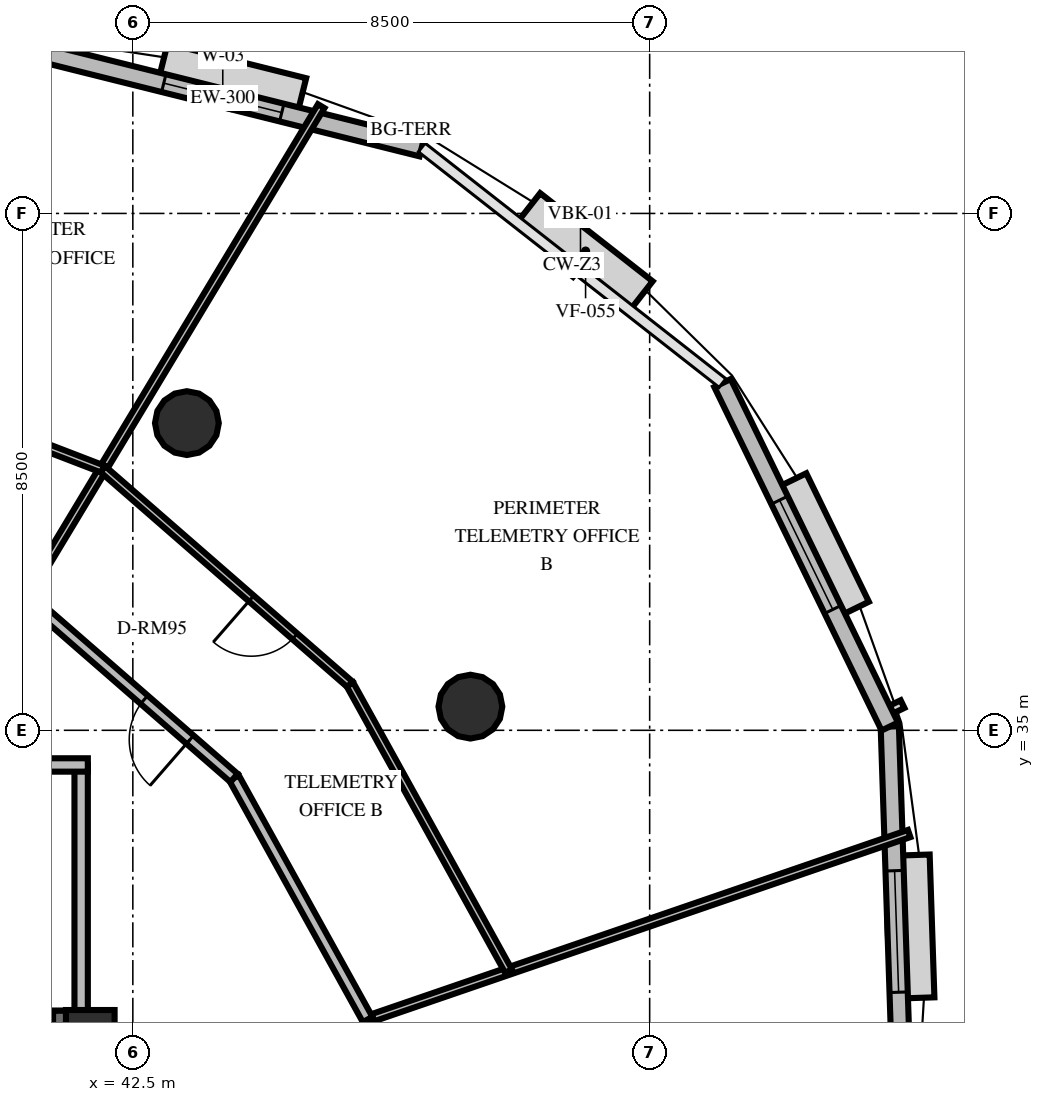
"""IFC4 building model, lengths in metres.
Left out: names, types, materials, properties, quantities, classifications, styles, units other than length and angle.
Written with IfcOpenShell. Run it as: python <this file> out.ifc"""

import sys

from ifc_helpers import new_model, si_unit, direction, frame, frame_2d, origin, origin_2d, place, context, subcontext, project, spatial, rectangle, circle, extrude, element, fill, save


model = new_model("IFC4")
c1 = context("Model", 3, precision=1e-05, world=origin(), true_north=direction((0.0, 1.0)))
c2 = subcontext(c1, "Body", "Model", "MODEL_VIEW")
j1 = project(units=[si_unit("LENGTHUNIT", "METRE"), si_unit("PLANEANGLEUNIT", "RADIAN")], contexts=[c1])
p1 = place(None, origin())
s1 = spatial("IfcSite", under=j1, at=p1, CompositionType="ELEMENT")
p2 = place(p1, origin())
s2 = spatial("IfcBuilding", under=s1, at=p2, CompositionType="ELEMENT")
p3 = place(p2, frame((0.0, 0.0, 195.2)))
s3 = spatial("IfcBuildingStorey", under=s2, at=p3, CompositionType="ELEMENT", Elevation=195.2)
p4 = place(p3, frame((26.072, 30.013, 0.0), z_axis=(0.0, 0.0, 1.0), x_axis=(1.0, 0.0, 0.0)))
e1 = element("IfcWall", 1, at=p4, inside=s3, PredefinedType="SHEAR", context=c2, shape_type="SweptSolid", body=[
    extrude(rectangle(XDim=15.866, YDim=0.75, at=frame_2d((7.933, 0.0))), origin(), (0.0, 0.0, 1.0), 3.6),
])
p5 = place(p4, frame((0.878, 0.0, 0.0)))
e2 = element("IfcOpeningElement", 2, at=p5, cuts=e1, PredefinedType="OPENING", context=c2, shape_type="SweptSolid", body=[
    extrude(rectangle(XDim=1.05, YDim=2.15, at=frame_2d((0.525, 1.075))), frame((0.0, 0.385, 0.0), z_axis=(0.0, -1.0, 0.0), x_axis=(1.0, 0.0, 0.0)), (0.0, 0.0, 1.0), 0.77),
])
p6 = place(p4, frame((13.928, 0.0, 0.0)))
e3 = element("IfcOpeningElement", 3, at=p6, cuts=e1, PredefinedType="OPENING", context=c2, shape_type="SweptSolid", body=[
    extrude(rectangle(XDim=1.05, YDim=2.15, at=frame_2d((0.525, 1.075))), frame((0.0, 0.385, 0.0), z_axis=(0.0, -1.0, 0.0), x_axis=(1.0, 0.0, 0.0)), (0.0, 0.0, 1.0), 0.77),
])
p7 = place(p4, frame((7.378, 0.0, 0.0)))
e4 = element("IfcOpeningElement", 4, at=p7, cuts=e1, PredefinedType="OPENING", context=c2, shape_type="SweptSolid", body=[
    extrude(rectangle(XDim=1.1, YDim=2.15, at=frame_2d((0.55, 1.075))), frame((0.0, 0.385, 0.0), z_axis=(0.0, -1.0, 0.0), x_axis=(1.0, 0.0, 0.0)), (0.0, 0.0, 1.0), 0.77),
])
p8 = place(p3, frame((41.563, 19.812, 0.0), z_axis=(0.0, 0.0, 1.0), x_axis=(0.0, 1.0, 0.0)))
e5 = element("IfcWall", 5, at=p8, inside=s3, PredefinedType="SHEAR", context=c2, shape_type="SweptSolid", body=[
    extrude(rectangle(XDim=10.576, YDim=0.75, at=frame_2d((5.288, 0.0))), origin(), (0.0, 0.0, 1.0), 3.6),
])
p9 = place(p3, frame((41.8, 30.0, 0.0), z_axis=(0.0, 0.0, 1.0), x_axis=(1.0, 0.0, 0.0)))
e6 = element("IfcColumn", 6, at=p9, inside=s3, PredefinedType="PILASTER", context=c2, shape_type="SweptSolid", body=[
    extrude(rectangle(XDim=0.8, YDim=0.8, at=origin_2d()), origin(), (0.0, 0.0, 1.0), 3.6),
])
for number, where, z_axis, x_axis in (
    (7, (48.052, 35.389, 0.0), (0.0, 0.0, 1.0), (1.0, 0.0, 0.0)),
    (8, (43.389, 40.052, 0.0), (0.0, 0.0, 1.0), (1.0, 0.0, 0.0)),
):
    element("IfcColumn", number, at=place(p3, frame(where, z_axis=z_axis, x_axis=x_axis)), inside=s3, PredefinedType="COLUMN", context=c2, shape_type="SweptSolid", body=[
        extrude(circle(Radius=0.525, at=origin_2d()), origin(), (0.0, 0.0, 1.0), 3.6),
    ])
p10 = place(p3, frame((47.252, 44.584, 0.0), z_axis=(0.0, 0.0, 1.0), x_axis=(-0.970265866101, 0.242041626748, 0.0)))
e9 = element("IfcWall", 9, at=p10, inside=s3, PredefinedType="SOLIDWALL", context=c2, shape_type="SweptSolid", body=[
    extrude(rectangle(XDim=6.745, YDim=0.3, at=frame_2d((3.373, 0.0))), origin(), (0.0, 0.0, 1.0), 2.66),
])
p11 = place(p10, frame((2.373, 0.0, 0.8)))
e10 = element("IfcOpeningElement", 10, at=p11, cuts=e9, PredefinedType="OPENING", context=c2, shape_type="SweptSolid", body=[
    extrude(rectangle(XDim=2.0, YDim=1.85, at=frame_2d((1.0, 0.925))), frame((0.0, 0.16, 0.0), z_axis=(0.0, -1.0, 0.0), x_axis=(1.0, 0.0, 0.0)), (0.0, 0.0, 1.0), 0.32),
])
p12 = place(p3, frame((55.174, 28.321, 0.0), z_axis=(0.0, 0.0, 1.0), x_axis=(-0.033263008574, 0.999446633023, 0.0)))
e11 = element("IfcWall", 11, at=p12, inside=s3, PredefinedType="SOLIDWALL", context=c2, shape_type="SweptSolid", body=[
    extrude(rectangle(XDim=6.745, YDim=0.3, at=frame_2d((3.373, 0.0))), origin(), (0.0, 0.0, 1.0), 2.66),
])
p13 = place(p12, frame((2.373, 0.0, 0.8)))
e12 = element("IfcOpeningElement", 12, at=p13, cuts=e11, PredefinedType="OPENING", context=c2, shape_type="SweptSolid", body=[
    extrude(rectangle(XDim=2.0, YDim=1.85, at=frame_2d((1.0, 0.925))), frame((0.0, 0.16, 0.0), z_axis=(0.0, -1.0, 0.0), x_axis=(1.0, 0.0, 0.0)), (0.0, 0.0, 1.0), 0.32),
])
p14 = place(p3, frame((54.949, 35.062, 0.0), z_axis=(0.0, 0.0, 1.0), x_axis=(-0.437909831955, 0.899018898064, 0.0)))
e13 = element("IfcWall", 13, at=p14, inside=s3, PredefinedType="SOLIDWALL", context=c2, shape_type="SweptSolid", body=[
    extrude(rectangle(XDim=6.283, YDim=0.3, at=frame_2d((3.141, 0.0))), origin(), (0.0, 0.0, 1.0), 2.66),
])
p15 = place(p14, frame((2.141, 0.0, 0.8)))
e14 = element("IfcOpeningElement", 14, at=p15, cuts=e13, PredefinedType="OPENING", context=c2, shape_type="SweptSolid", body=[
    extrude(rectangle(XDim=2.0, YDim=1.85, at=frame_2d((1.0, 0.925))), frame((0.0, 0.16, 0.0), z_axis=(0.0, -1.0, 0.0), x_axis=(1.0, 0.0, 0.0)), (0.0, 0.0, 1.0), 0.32),
])
p16 = place(p3, frame((41.65, 30.05, 0.0), z_axis=(0.0, 0.0, 1.0), x_axis=(0.0, 1.0, 0.0)))
e15 = element("IfcWall", 15, at=p16, inside=s3, PredefinedType="SOLIDWALL", context=c2, shape_type="SweptSolid", body=[
    extrude(rectangle(XDim=4.38, YDim=0.22, at=frame_2d((2.19, 0.0))), origin(), (0.0, 0.0, 1.0), 2.46),
])
p17 = place(p3, frame((37.45, 34.43, 0.0), z_axis=(0.0, 0.0, 1.0), x_axis=(1.0, 0.0, 0.0)))
e16 = element("IfcWall", 16, at=p17, inside=s3, PredefinedType="SOLIDWALL", context=c2, shape_type="SweptSolid", body=[
    extrude(rectangle(XDim=4.31, YDim=0.22, at=frame_2d((2.155, 0.0))), origin(), (0.0, 0.0, 1.0), 2.46),
])
p18 = place(p17, frame((1.6, 0.0, 0.0)))
e17 = element("IfcOpeningElement", 17, at=p18, cuts=e16, PredefinedType="OPENING", context=c2, shape_type="SweptSolid", body=[
    extrude(rectangle(XDim=1.1, YDim=2.15, at=frame_2d((0.55, 1.075))), frame((0.0, 0.12, 0.0), z_axis=(0.0, -1.0, 0.0), x_axis=(1.0, 0.0, 0.0)), (0.0, 0.0, 1.0), 0.24),
])
p19 = place(p3, frame((46.362, 30.244, 0.0), z_axis=(0.0, 0.0, 1.0), x_axis=(0.945803358449, 0.324739906921, 0.0)))
e18 = element("IfcWall", 18, at=p19, inside=s3, PredefinedType="PARTITIONING", context=c2, shape_type="SweptSolid", body=[
    extrude(rectangle(XDim=9.416, YDim=0.125, at=frame_2d((4.708, 0.0))), origin(), (0.0, 0.0, 1.0), 2.46),
])
p20 = place(p3, frame((47.053, 26.673, 0.0), z_axis=(0.0, 0.0, 1.0), x_axis=(-0.189982260964, 0.981787523102, 0.0)))
e19 = element("IfcWall", 19, at=p20, inside=s3, PredefinedType="PARTITIONING", context=c2, shape_type="SweptSolid", body=[
    extrude(rectangle(XDim=3.638, YDim=0.18, at=frame_2d((1.819, 0.0))), origin(), (0.0, 0.0, 1.0), 2.46),
])
p21 = place(p20, frame((0.735, 0.0, 0.0)))
e20 = element("IfcOpeningElement", 20, at=p21, cuts=e19, PredefinedType="OPENING", context=c2, shape_type="SweptSolid", body=[
    extrude(rectangle(XDim=1.0, YDim=2.15, at=frame_2d((0.5, 1.075))), frame((0.0, 0.1, 0.0), z_axis=(0.0, -1.0, 0.0), x_axis=(1.0, 0.0, 0.0)), (0.0, 0.0, 1.0), 0.2),
])
p22 = place(p3, frame((40.741, 37.197, 0.0), z_axis=(0.0, 0.0, 1.0), x_axis=(0.515795335876, 0.856711836903, 0.0)))
e21 = element("IfcWall", 21, at=p22, inside=s3, PredefinedType="PARTITIONING", context=c2, shape_type="SweptSolid", body=[
    extrude(rectangle(XDim=9.417, YDim=0.125, at=frame_2d((4.708, 0.0))), origin(), (0.0, 0.0, 1.0), 2.46),
])
p23 = place(p3, frame((46.362, 30.244, 0.0), z_axis=(0.0, 0.0, 1.0), x_axis=(-0.484025458678, 0.875053915683, 0.0)))
e22 = element("IfcWall", 22, at=p23, inside=s3, PredefinedType="PARTITIONING", context=c2, shape_type="SweptSolid", body=[
    extrude(rectangle(XDim=4.539, YDim=0.18, at=frame_2d((2.27, 0.0))), origin(), (0.0, 0.0, 1.0), 2.46),
])
p24 = place(p3, frame((44.165, 34.216, 0.0), z_axis=(0.0, 0.0, 1.0), x_axis=(-0.754153769573, 0.656697869525, 0.0)))
e23 = element("IfcWall", 23, at=p24, inside=s3, PredefinedType="PARTITIONING", context=c2, shape_type="SweptSolid", body=[
    extrude(rectangle(XDim=4.539, YDim=0.18, at=frame_2d((2.27, 0.0))), origin(), (0.0, 0.0, 1.0), 2.46),
])
p25 = place(p24, frame((0.96, 0.0, 0.0)))
e24 = element("IfcOpeningElement", 24, at=p25, cuts=e23, PredefinedType="OPENING", context=c2, shape_type="SweptSolid", body=[
    extrude(rectangle(XDim=1.0, YDim=2.15, at=frame_2d((0.5, 1.075))), frame((0.0, 0.1, 0.0), z_axis=(0.0, -1.0, 0.0), x_axis=(1.0, 0.0, 0.0)), (0.0, 0.0, 1.0), 0.2),
])
p26 = place(p3, frame((48.679, 31.04, 0.0), z_axis=(0.0, 0.0, 1.0), x_axis=(-0.484057695698, 0.87503608339, 0.0)))
e25 = element("IfcWall", 25, at=p26, inside=s3, PredefinedType="PARTITIONING", context=c2, shape_type="SweptSolid", body=[
    extrude(rectangle(XDim=5.39, YDim=0.125, at=frame_2d((2.695, 0.0))), origin(), (0.0, 0.0, 1.0), 2.46),
])
p27 = place(p3, frame((46.07, 35.757, 0.0), z_axis=(0.0, 0.0, 1.0), x_axis=(-0.754140206691, 0.656713444854, 0.0)))
e26 = element("IfcWall", 26, at=p27, inside=s3, PredefinedType="PARTITIONING", context=c2, shape_type="SweptSolid", body=[
    extrude(rectangle(XDim=5.39, YDim=0.125, at=frame_2d((2.695, 0.0))), origin(), (0.0, 0.0, 1.0), 2.46),
])
p28 = place(p27, frame((1.2, 0.0, 0.0)))
e27 = element("IfcOpeningElement", 27, at=p28, cuts=e26, PredefinedType="OPENING", context=c2, shape_type="SweptSolid", body=[
    extrude(rectangle(XDim=0.95, YDim=2.15, at=frame_2d((0.475, 1.075))), frame((0.0, 0.073, 0.0), z_axis=(0.0, -1.0, 0.0), x_axis=(1.0, 0.0, 0.0)), (0.0, 0.0, 1.0), 0.145),
])
p29 = place(p3, frame((42.005, 39.296, 0.0), z_axis=(0.0, 0.0, 1.0), x_axis=(-0.933263863739, 0.359191537539, 0.0)))
e28 = element("IfcWall", 28, at=p29, inside=s3, PredefinedType="PARTITIONING", context=c2, shape_type="SweptSolid", body=[
    extrude(rectangle(XDim=5.39, YDim=0.125, at=frame_2d((2.695, 0.0))), origin(), (0.0, 0.0, 1.0), 2.46),
])
p30 = place(p11, origin())
e29 = element("IfcWindow", 29, at=p30, inside=s3, PartitioningType="SINGLE_PANEL", PredefinedType="WINDOW", context=c2, shape_type="SweptSolid", body=[
    extrude(rectangle(XDim=2.0, YDim=1.85, at=frame_2d((1.0, 0.925))), frame((0.0, 0.03, 0.0), z_axis=(0.0, -1.0, 0.0), x_axis=(1.0, 0.0, 0.0)), (0.0, 0.0, 1.0), 0.06),
])
fill(e10, e29)
p31 = place(p13, origin())
e30 = element("IfcWindow", 30, at=p31, inside=s3, PartitioningType="SINGLE_PANEL", PredefinedType="WINDOW", context=c2, shape_type="SweptSolid", body=[
    extrude(rectangle(XDim=2.0, YDim=1.85, at=frame_2d((1.0, 0.925))), frame((0.0, 0.03, 0.0), z_axis=(0.0, -1.0, 0.0), x_axis=(1.0, 0.0, 0.0)), (0.0, 0.0, 1.0), 0.06),
])
fill(e12, e30)
p32 = place(p15, origin())
e31 = element("IfcWindow", 31, at=p32, inside=s3, PartitioningType="SINGLE_PANEL", PredefinedType="WINDOW", context=c2, shape_type="SweptSolid", body=[
    extrude(rectangle(XDim=2.0, YDim=1.85, at=frame_2d((1.0, 0.925))), frame((0.0, 0.03, 0.0), z_axis=(0.0, -1.0, 0.0), x_axis=(1.0, 0.0, 0.0)), (0.0, 0.0, 1.0), 0.06),
])
fill(e14, e31)
p33 = place(p25, origin())
e32 = element("IfcDoor", 32, at=p33, inside=s3, OperationType="SINGLE_SWING_LEFT", PredefinedType="DOOR", context=c2, shape_type="SweptSolid", body=[
    extrude(rectangle(XDim=1.0, YDim=2.15, at=frame_2d((0.5, 1.075))), frame((0.0, 0.025, 0.0), z_axis=(0.0, -1.0, 0.0), x_axis=(1.0, 0.0, 0.0)), (0.0, 0.0, 1.0), 0.05),
])
fill(e24, e32)
p34 = place(p28, origin())
e33 = element("IfcDoor", 33, at=p34, inside=s3, OperationType="SINGLE_SWING_RIGHT", PredefinedType="DOOR", context=c2, shape_type="SweptSolid", body=[
    extrude(rectangle(XDim=0.95, YDim=2.15, at=frame_2d((0.475, 1.075))), frame((0.0, 0.025, 0.0), z_axis=(0.0, -1.0, 0.0), x_axis=(1.0, 0.0, 0.0)), (0.0, 0.0, 1.0), 0.05),
])
fill(e27, e33)
save(model, sys.argv[1])
